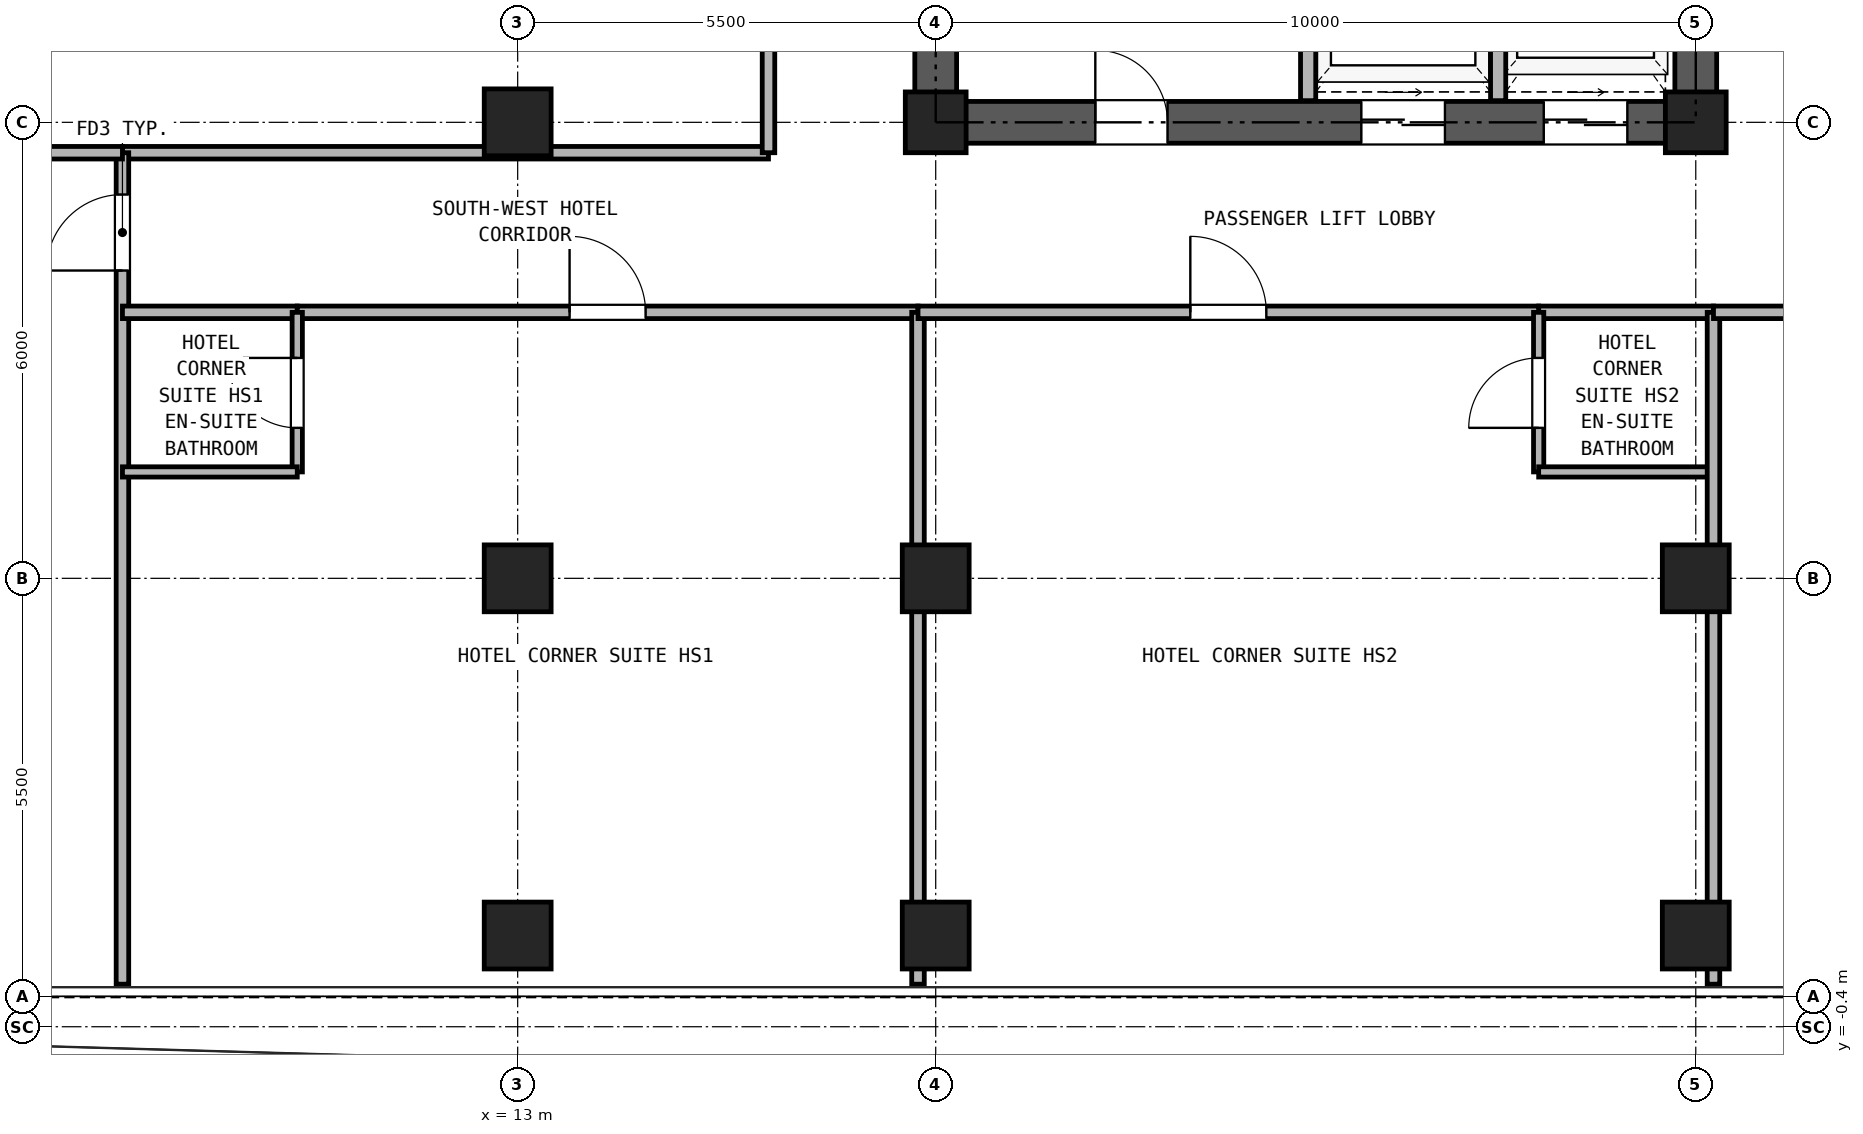
"""IFC4 building model, lengths in metres.
Left out: names, types, materials, properties, quantities, classifications, styles, units other than length and angle.
Written with IfcOpenShell. Run it as: python <this file> out.ifc"""

import sys

from ifc_helpers import new_model, si_unit, direction, frame, frame_2d, origin, origin_2d, place, context, subcontext, project, spatial, rectangle, hollow_rectangle, extrude, source, transform, mapped, element, fill, save


model = new_model("IFC4")
c1 = context("Model", 3, precision=1e-05, world=origin(), true_north=direction((0.0, 1.0)))
c2 = subcontext(c1, "Body", "Model", "MODEL_VIEW")
j1 = project(units=[si_unit("LENGTHUNIT", "METRE"), si_unit("PLANEANGLEUNIT", "RADIAN")], contexts=[c1])
p1 = place(None, origin())
s1 = spatial("IfcSite", under=j1, at=p1, CompositionType="ELEMENT")
p2 = place(p1, origin())
s2 = spatial("IfcBuilding", under=s1, at=p2, CompositionType="ELEMENT")
p3 = place(p2, frame((0.0, 0.0, 148.4)))
s3 = spatial("IfcBuildingStorey", under=s2, at=p3, CompositionType="ELEMENT", Elevation=148.4)
m1 = source(origin(), c2, "Body", "SweptSolid", [
    extrude(hollow_rectangle(XDim=0.88, YDim=0.88, WallThickness=0.05, at=origin_2d()), origin(), (0.0, 0.0, 1.0), 2.84),
])
for number, where, z_axis, x_axis in (
    (1, (13.0, 0.8, 0.0), (0.0, 0.0, 1.0), (1.0, 0.0, 0.0)),
    (2, (18.5, 0.8, 0.0), (0.0, 0.0, 1.0), (1.0, 0.0, 0.0)),
    (3, (28.5, 0.8, 0.0), (0.0, 0.0, 1.0), (1.0, 0.0, 0.0)),
    (4, (13.0, 5.5, 0.0), (0.0, 0.0, 1.0), (1.0, 0.0, 0.0)),
    (5, (13.0, 11.5, 0.0), (0.0, 0.0, 1.0), (1.0, 0.0, 0.0)),
    (6, (18.5, 5.5, 0.0), (0.0, 0.0, 1.0), (1.0, 0.0, 0.0)),
):
    element("IfcColumn", number, at=place(p3, frame(where, z_axis=z_axis, x_axis=x_axis)), inside=s3, PredefinedType="COLUMN", context=c2, shape_type="MappedRepresentation", body=[
        mapped(m1, transform((0.0, 0.0, 0.0), x_axis=(1.0, 0.0, 0.0), y_axis=(0.0, 1.0, 0.0), z_axis=(0.0, 0.0, 1.0), scale=1.0)),
    ])
m2 = source(origin(), c2, "Body", "SweptSolid", [
    extrude(hollow_rectangle(XDim=0.8, YDim=0.8, WallThickness=0.045, at=origin_2d()), origin(), (0.0, 0.0, 1.0), 2.84),
])
p4 = place(p3, frame((18.5, 11.5, 0.0), z_axis=(0.0, 0.0, 1.0), x_axis=(1.0, 0.0, 0.0)))
e7 = element("IfcColumn", 7, at=p4, inside=s3, PredefinedType="COLUMN", context=c2, shape_type="MappedRepresentation", body=[
    mapped(m2, transform((0.0, 0.0, 0.0), x_axis=(1.0, 0.0, 0.0), y_axis=(0.0, 1.0, 0.0), z_axis=(0.0, 0.0, 1.0), scale=1.0)),
])
p5 = place(p3, frame((28.5, 5.5, 0.0), z_axis=(0.0, 0.0, 1.0), x_axis=(1.0, 0.0, 0.0)))
e8 = element("IfcColumn", 8, at=p5, inside=s3, PredefinedType="COLUMN", context=c2, shape_type="MappedRepresentation", body=[
    mapped(m1, transform((0.0, 0.0, 0.0), x_axis=(1.0, 0.0, 0.0), y_axis=(0.0, 1.0, 0.0), z_axis=(0.0, 0.0, 1.0), scale=1.0)),
])
p6 = place(p3, frame((28.5, 11.5, 0.0), z_axis=(0.0, 0.0, 1.0), x_axis=(1.0, 0.0, 0.0)))
e9 = element("IfcColumn", 9, at=p6, inside=s3, PredefinedType="COLUMN", context=c2, shape_type="MappedRepresentation", body=[
    mapped(m2, transform((0.0, 0.0, 0.0), x_axis=(1.0, 0.0, 0.0), y_axis=(0.0, 1.0, 0.0), z_axis=(0.0, 0.0, 1.0), scale=1.0)),
])
p7 = place(p3, frame((18.225, 11.5, 0.0), z_axis=(0.0, 0.0, 1.0), x_axis=(1.0, 0.0, 0.0)))
e10 = element("IfcWall", 10, at=p7, inside=s3, PredefinedType="SHEAR", context=c2, shape_type="SweptSolid", body=[
    extrude(rectangle(XDim=10.55, YDim=0.55, at=frame_2d((5.275, 0.0))), origin(), (0.0, 0.0, 1.0), 2.84),
])
p8 = place(p7, frame((2.375, 0.0, 0.0)))
e11 = element("IfcOpeningElement", 11, at=p8, cuts=e10, PredefinedType="OPENING", context=c2, shape_type="SweptSolid", body=[
    extrude(rectangle(XDim=0.95, YDim=2.15, at=frame_2d((0.475, 1.075))), frame((0.0, 0.285, 0.0), z_axis=(0.0, -1.0, 0.0), x_axis=(1.0, 0.0, 0.0)), (0.0, 0.0, 1.0), 0.57),
])
p9 = place(p7, frame((5.875, 0.0, 0.0)))
e12 = element("IfcOpeningElement", 12, at=p9, cuts=e10, PredefinedType="OPENING", context=c2, shape_type="SweptSolid", body=[
    extrude(rectangle(XDim=1.1, YDim=2.25, at=frame_2d((0.55, 1.125))), frame((0.0, 0.285, 0.0), z_axis=(0.0, -1.0, 0.0), x_axis=(1.0, 0.0, 0.0)), (0.0, 0.0, 1.0), 0.57),
])
p10 = place(p7, frame((8.275, 0.0, 0.0)))
e13 = element("IfcOpeningElement", 13, at=p10, cuts=e10, PredefinedType="OPENING", context=c2, shape_type="SweptSolid", body=[
    extrude(rectangle(XDim=1.1, YDim=2.25, at=frame_2d((0.55, 1.125))), frame((0.0, 0.285, 0.0), z_axis=(0.0, -1.0, 0.0), x_axis=(1.0, 0.0, 0.0)), (0.0, 0.0, 1.0), 0.57),
])
p11 = place(p3, frame((18.5, 11.775, 0.0), z_axis=(0.0, 0.0, 1.0), x_axis=(0.0, 1.0, 0.0)))
e14 = element("IfcWall", 14, at=p11, inside=s3, PredefinedType="SHEAR", context=c2, shape_type="SweptSolid", body=[
    extrude(rectangle(XDim=16.7, YDim=0.55, at=frame_2d((8.35, 0.0))), origin(), (0.0, 0.0, 1.0), 2.84),
])
p12 = place(p11, frame((7.375, 0.0, 0.0)))
e15 = element("IfcOpeningElement", 15, at=p12, cuts=e14, PredefinedType="OPENING", context=c2, shape_type="SweptSolid", body=[
    extrude(rectangle(XDim=1.15, YDim=2.2, at=frame_2d((0.575, 1.1))), frame((0.0, 0.285, 0.0), z_axis=(0.0, -1.0, 0.0), x_axis=(1.0, 0.0, 0.0)), (0.0, 0.0, 1.0), 0.57),
])
p13 = place(p3, frame((28.5, 11.775, 0.0), z_axis=(0.0, 0.0, 1.0), x_axis=(0.0, 1.0, 0.0)))
e16 = element("IfcWall", 16, at=p13, inside=s3, PredefinedType="SHEAR", context=c2, shape_type="SweptSolid", body=[
    extrude(rectangle(XDim=16.7, YDim=0.55, at=frame_2d((8.35, 0.0))), origin(), (0.0, 0.0, 1.0), 2.84),
])
p14 = place(p13, frame((7.375, 0.0, 0.0)))
e17 = element("IfcOpeningElement", 17, at=p14, cuts=e16, PredefinedType="OPENING", context=c2, shape_type="SweptSolid", body=[
    extrude(rectangle(XDim=1.15, YDim=2.2, at=frame_2d((0.575, 1.1))), frame((0.0, 0.285, 0.0), z_axis=(0.0, -1.0, 0.0), x_axis=(1.0, 0.0, 0.0)), (0.0, 0.0, 1.0), 0.57),
])
for number, where, z_axis, x_axis in (
    (18, (23.4, 11.785, 0.0), (0.0, 0.0, 1.0), (0.0, 1.0, 0.0)),
    (19, (25.9, 11.785, 0.0), (0.0, 0.0, 1.0), (0.0, 1.0, 0.0)),
):
    element("IfcWall", number, at=place(p3, frame(where, z_axis=z_axis, x_axis=x_axis)), inside=s3, PredefinedType="PARTITIONING", context=c2, shape_type="SweptSolid", body=[
        extrude(rectangle(XDim=3.215, YDim=0.2, at=frame_2d((1.607, 0.0))), origin(), (0.0, 0.0, 1.0), 2.84),
    ])
p15 = place(p3, frame((7.8, 11.1, 0.0), z_axis=(0.0, 0.0, 1.0), x_axis=(1.0, 0.0, 0.0)))
e20 = element("IfcWall", 20, at=p15, inside=s3, PredefinedType="PARTITIONING", context=c2, shape_type="SweptSolid", body=[
    extrude(rectangle(XDim=8.5, YDim=0.165, at=frame_2d((4.25, 0.0))), origin(), (0.0, 0.0, 1.0), 2.84),
])
p16 = place(p3, frame((16.3, 11.1, 0.0), z_axis=(0.0, 0.0, 1.0), x_axis=(0.0, 1.0, 0.0)))
e21 = element("IfcWall", 21, at=p16, inside=s3, PredefinedType="PARTITIONING", context=c2, shape_type="SweptSolid", body=[
    extrude(rectangle(XDim=18.5, YDim=0.165, at=frame_2d((9.25, 0.0))), origin(), (0.0, 0.0, 1.0), 2.84),
])
p17 = place(p16, frame((4.125, 0.0, 0.0)))
e22 = element("IfcOpeningElement", 22, at=p17, cuts=e21, PredefinedType="OPENING", context=c2, shape_type="SweptSolid", body=[
    extrude(rectangle(XDim=0.95, YDim=2.15, at=frame_2d((0.475, 1.075))), frame((0.0, 0.093, 0.0), z_axis=(0.0, -1.0, 0.0), x_axis=(1.0, 0.0, 0.0)), (0.0, 0.0, 1.0), 0.185),
])
p18 = place(p16, frame((13.375, 0.0, 0.0)))
e23 = element("IfcOpeningElement", 23, at=p18, cuts=e21, PredefinedType="OPENING", context=c2, shape_type="SweptSolid", body=[
    extrude(rectangle(XDim=0.95, YDim=2.15, at=frame_2d((0.475, 1.075))), frame((0.0, 0.093, 0.0), z_axis=(0.0, -1.0, 0.0), x_axis=(1.0, 0.0, 0.0)), (0.0, 0.0, 1.0), 0.185),
])
p19 = place(p3, frame((7.8, 0.16, 0.0), z_axis=(0.0, 0.0, 1.0), x_axis=(0.0, 1.0, 0.0)))
e24 = element("IfcWall", 24, at=p19, inside=s3, PredefinedType="PARTITIONING", context=c2, shape_type="SweptSolid", body=[
    extrude(rectangle(XDim=10.94, YDim=0.165, at=frame_2d((5.47, 0.0))), origin(), (0.0, 0.0, 1.0), 2.84),
])
p20 = place(p19, frame((9.39, 0.0, 0.0)))
e25 = element("IfcOpeningElement", 25, at=p20, cuts=e24, PredefinedType="OPENING", context=c2, shape_type="SweptSolid", body=[
    extrude(rectangle(XDim=1.0, YDim=2.15, at=frame_2d((0.5, 1.075))), frame((0.0, 0.093, 0.0), z_axis=(0.0, -1.0, 0.0), x_axis=(1.0, 0.0, 0.0)), (0.0, 0.0, 1.0), 0.185),
])
p21 = place(p3, frame((0.16, 11.1, 0.0), z_axis=(0.0, 0.0, 1.0), x_axis=(1.0, 0.0, 0.0)))
e26 = element("IfcWall", 26, at=p21, inside=s3, PredefinedType="PARTITIONING", context=c2, shape_type="SweptSolid", body=[
    extrude(rectangle(XDim=7.64, YDim=0.165, at=frame_2d((3.82, 0.0))), origin(), (0.0, 0.0, 1.0), 2.84),
])
p22 = place(p3, frame((7.8, 9.0, 0.0), z_axis=(0.0, 0.0, 1.0), x_axis=(1.0, 0.0, 0.0)))
e27 = element("IfcWall", 27, at=p22, inside=s3, PredefinedType="PARTITIONING", context=c2, shape_type="SweptSolid", body=[
    extrude(rectangle(XDim=2.3, YDim=0.165, at=frame_2d((1.15, 0.0))), origin(), (0.0, 0.0, 1.0), 2.84),
])
p23 = place(p3, frame((10.1, 9.0, 0.0), z_axis=(0.0, 0.0, 1.0), x_axis=(1.0, 0.0, 0.0)))
e28 = element("IfcWall", 28, at=p23, inside=s3, PredefinedType="PARTITIONING", context=c2, shape_type="SweptSolid", body=[
    extrude(rectangle(XDim=8.167, YDim=0.165, at=frame_2d((4.083, 0.0))), origin(), (0.0, 0.0, 1.0), 2.84),
])
p24 = place(p23, frame((3.583, 0.0, 0.0)))
e29 = element("IfcOpeningElement", 29, at=p24, cuts=e28, PredefinedType="OPENING", context=c2, shape_type="SweptSolid", body=[
    extrude(rectangle(XDim=1.0, YDim=2.15, at=frame_2d((0.5, 1.075))), frame((0.0, 0.093, 0.0), z_axis=(0.0, -1.0, 0.0), x_axis=(1.0, 0.0, 0.0)), (0.0, 0.0, 1.0), 0.185),
])
p25 = place(p3, frame((10.1, 6.9, 0.0), z_axis=(0.0, 0.0, 1.0), x_axis=(0.0, 1.0, 0.0)))
e30 = element("IfcWall", 30, at=p25, inside=s3, PredefinedType="PARTITIONING", context=c2, shape_type="SweptSolid", body=[
    extrude(rectangle(XDim=2.1, YDim=0.135, at=frame_2d((1.05, 0.0))), origin(), (0.0, 0.0, 1.0), 2.84),
])
p26 = place(p25, frame((0.58, 0.0, 0.0)))
e31 = element("IfcOpeningElement", 31, at=p26, cuts=e30, PredefinedType="OPENING", context=c2, shape_type="SweptSolid", body=[
    extrude(rectangle(XDim=0.92, YDim=2.1, at=frame_2d((0.46, 1.05))), frame((0.0, 0.077, 0.0), z_axis=(0.0, -1.0, 0.0), x_axis=(1.0, 0.0, 0.0)), (0.0, 0.0, 1.0), 0.155),
])
p27 = place(p3, frame((7.8, 6.9, 0.0), z_axis=(0.0, 0.0, 1.0), x_axis=(1.0, 0.0, 0.0)))
e32 = element("IfcWall", 32, at=p27, inside=s3, PredefinedType="PARTITIONING", context=c2, shape_type="SweptSolid", body=[
    extrude(rectangle(XDim=2.3, YDim=0.135, at=frame_2d((1.15, 0.0))), origin(), (0.0, 0.0, 1.0), 2.84),
])
p28 = place(p3, frame((18.267, 0.16, 0.0), z_axis=(0.0, 0.0, 1.0), x_axis=(0.0, 1.0, 0.0)))
e33 = element("IfcWall", 33, at=p28, inside=s3, PredefinedType="PARTITIONING", context=c2, shape_type="SweptSolid", body=[
    extrude(rectangle(XDim=8.84, YDim=0.165, at=frame_2d((4.42, 0.0))), origin(), (0.0, 0.0, 1.0), 2.137),
])
p29 = place(p3, frame((26.433, 9.0, 0.0), z_axis=(0.0, 0.0, 1.0), x_axis=(1.0, 0.0, 0.0)))
e34 = element("IfcWall", 34, at=p29, inside=s3, PredefinedType="PARTITIONING", context=c2, shape_type="SweptSolid", body=[
    extrude(rectangle(XDim=2.3, YDim=0.165, at=frame_2d((1.15, 0.0))), origin(), (0.0, 0.0, 1.0), 2.84),
])
p30 = place(p3, frame((18.267, 9.0, 0.0), z_axis=(0.0, 0.0, 1.0), x_axis=(1.0, 0.0, 0.0)))
e35 = element("IfcWall", 35, at=p30, inside=s3, PredefinedType="PARTITIONING", context=c2, shape_type="SweptSolid", body=[
    extrude(rectangle(XDim=8.166, YDim=0.165, at=frame_2d((4.083, 0.0))), origin(), (0.0, 0.0, 1.0), 2.84),
])
p31 = place(p30, frame((3.583, 0.0, 0.0)))
e36 = element("IfcOpeningElement", 36, at=p31, cuts=e35, PredefinedType="OPENING", context=c2, shape_type="SweptSolid", body=[
    extrude(rectangle(XDim=1.0, YDim=2.15, at=frame_2d((0.5, 1.075))), frame((0.0, 0.093, 0.0), z_axis=(0.0, -1.0, 0.0), x_axis=(1.0, 0.0, 0.0)), (0.0, 0.0, 1.0), 0.185),
])
p32 = place(p3, frame((26.433, 6.9, 0.0), z_axis=(0.0, 0.0, 1.0), x_axis=(0.0, 1.0, 0.0)))
e37 = element("IfcWall", 37, at=p32, inside=s3, PredefinedType="PARTITIONING", context=c2, shape_type="SweptSolid", body=[
    extrude(rectangle(XDim=2.1, YDim=0.135, at=frame_2d((1.05, 0.0))), origin(), (0.0, 0.0, 1.0), 2.84),
])
p33 = place(p32, frame((0.58, 0.0, 0.0)))
e38 = element("IfcOpeningElement", 38, at=p33, cuts=e37, PredefinedType="OPENING", context=c2, shape_type="SweptSolid", body=[
    extrude(rectangle(XDim=0.92, YDim=2.1, at=frame_2d((0.46, 1.05))), frame((0.0, 0.077, 0.0), z_axis=(0.0, -1.0, 0.0), x_axis=(1.0, 0.0, 0.0)), (0.0, 0.0, 1.0), 0.155),
])
p34 = place(p3, frame((26.433, 6.9, 0.0), z_axis=(0.0, 0.0, 1.0), x_axis=(1.0, 0.0, 0.0)))
e39 = element("IfcWall", 39, at=p34, inside=s3, PredefinedType="PARTITIONING", context=c2, shape_type="SweptSolid", body=[
    extrude(rectangle(XDim=2.3, YDim=0.135, at=frame_2d((1.15, 0.0))), origin(), (0.0, 0.0, 1.0), 2.84),
])
p35 = place(p3, frame((28.733, 0.16, 0.0), z_axis=(0.0, 0.0, 1.0), x_axis=(0.0, 1.0, 0.0)))
e40 = element("IfcWall", 40, at=p35, inside=s3, PredefinedType="PARTITIONING", context=c2, shape_type="SweptSolid", body=[
    extrude(rectangle(XDim=8.84, YDim=0.165, at=frame_2d((4.42, 0.0))), origin(), (0.0, 0.0, 1.0), 2.137),
])
p36 = place(p3, frame((28.733, 9.0, 0.0), z_axis=(0.0, 0.0, 1.0), x_axis=(1.0, 0.0, 0.0)))
e41 = element("IfcWall", 41, at=p36, inside=s3, PredefinedType="PARTITIONING", context=c2, shape_type="SweptSolid", body=[
    extrude(rectangle(XDim=8.167, YDim=0.165, at=frame_2d((4.083, 0.0))), origin(), (0.0, 0.0, 1.0), 2.84),
])
p37 = place(p36, frame((3.584, 0.0, 0.0)))
e42 = element("IfcOpeningElement", 42, at=p37, cuts=e41, PredefinedType="OPENING", context=c2, shape_type="SweptSolid", body=[
    extrude(rectangle(XDim=1.0, YDim=2.15, at=frame_2d((0.5, 1.075))), frame((0.0, 0.093, 0.0), z_axis=(0.0, -1.0, 0.0), x_axis=(1.0, 0.0, 0.0)), (0.0, 0.0, 1.0), 0.185),
])
p38 = place(p8, frame((0.95, 0.0, 0.0), z_axis=(0.0, 0.0, 1.0), x_axis=(-1.0, 0.0, 0.0)))
e43 = element("IfcDoor", 43, at=p38, inside=s3, OperationType="SINGLE_SWING_LEFT", PredefinedType="DOOR", context=c2, shape_type="SweptSolid", body=[
    extrude(rectangle(XDim=0.95, YDim=2.15, at=frame_2d((0.475, 1.075))), frame((0.0, 0.025, 0.0), z_axis=(0.0, -1.0, 0.0), x_axis=(1.0, 0.0, 0.0)), (0.0, 0.0, 1.0), 0.05),
])
fill(e11, e43)
p39 = place(p9, frame((1.1, 0.0, 0.0), z_axis=(0.0, 0.0, 1.0), x_axis=(-1.0, 0.0, 0.0)))
e44 = element("IfcDoor", 44, at=p39, inside=s3, OperationType="DOUBLE_DOOR_SLIDING", PredefinedType="DOOR", context=c2, shape_type="SweptSolid", body=[
    extrude(rectangle(XDim=1.1, YDim=2.25, at=frame_2d((0.55, 1.125))), frame((0.0, 0.025, 0.0), z_axis=(0.0, -1.0, 0.0), x_axis=(1.0, 0.0, 0.0)), (0.0, 0.0, 1.0), 0.05),
])
fill(e12, e44)
p40 = place(p10, frame((1.1, 0.0, 0.0), z_axis=(0.0, 0.0, 1.0), x_axis=(-1.0, 0.0, 0.0)))
e45 = element("IfcDoor", 45, at=p40, inside=s3, OperationType="DOUBLE_DOOR_SLIDING", PredefinedType="DOOR", context=c2, shape_type="SweptSolid", body=[
    extrude(rectangle(XDim=1.1, YDim=2.25, at=frame_2d((0.55, 1.125))), frame((0.0, 0.025, 0.0), z_axis=(0.0, -1.0, 0.0), x_axis=(1.0, 0.0, 0.0)), (0.0, 0.0, 1.0), 0.05),
])
fill(e13, e45)
p41 = place(p20, origin())
e46 = element("IfcDoor", 46, at=p41, inside=s3, OperationType="SINGLE_SWING_LEFT", PredefinedType="DOOR", context=c2, shape_type="SweptSolid", body=[
    extrude(rectangle(XDim=1.0, YDim=2.15, at=frame_2d((0.5, 1.075))), frame((0.0, 0.025, 0.0), z_axis=(0.0, -1.0, 0.0), x_axis=(1.0, 0.0, 0.0)), (0.0, 0.0, 1.0), 0.05),
])
fill(e25, e46)
p42 = place(p26, frame((0.92, 0.0, 0.0), z_axis=(0.0, 0.0, 1.0), x_axis=(-1.0, 0.0, 0.0)))
e47 = element("IfcDoor", 47, at=p42, inside=s3, OperationType="SINGLE_SWING_RIGHT", PredefinedType="DOOR", context=c2, shape_type="SweptSolid", body=[
    extrude(rectangle(XDim=0.92, YDim=2.1, at=frame_2d((0.46, 1.05))), frame((0.0, 0.025, 0.0), z_axis=(0.0, -1.0, 0.0), x_axis=(1.0, 0.0, 0.0)), (0.0, 0.0, 1.0), 0.05),
])
fill(e31, e47)
p43 = place(p24, frame((1.0, 0.0, 0.0), z_axis=(0.0, 0.0, 1.0), x_axis=(-1.0, 0.0, 0.0)))
e48 = element("IfcDoor", 48, at=p43, inside=s3, OperationType="SINGLE_SWING_LEFT", PredefinedType="DOOR", context=c2, shape_type="SweptSolid", body=[
    extrude(rectangle(XDim=1.0, YDim=2.15, at=frame_2d((0.5, 1.075))), frame((0.0, 0.025, 0.0), z_axis=(0.0, -1.0, 0.0), x_axis=(1.0, 0.0, 0.0)), (0.0, 0.0, 1.0), 0.05),
])
fill(e29, e48)
p44 = place(p33, origin())
e49 = element("IfcDoor", 49, at=p44, inside=s3, OperationType="SINGLE_SWING_LEFT", PredefinedType="DOOR", context=c2, shape_type="SweptSolid", body=[
    extrude(rectangle(XDim=0.92, YDim=2.1, at=frame_2d((0.46, 1.05))), frame((0.0, 0.025, 0.0), z_axis=(0.0, -1.0, 0.0), x_axis=(1.0, 0.0, 0.0)), (0.0, 0.0, 1.0), 0.05),
])
fill(e38, e49)
p45 = place(p31, frame((1.0, 0.0, 0.0), z_axis=(0.0, 0.0, 1.0), x_axis=(-1.0, 0.0, 0.0)))
e50 = element("IfcDoor", 50, at=p45, inside=s3, OperationType="SINGLE_SWING_LEFT", PredefinedType="DOOR", context=c2, shape_type="SweptSolid", body=[
    extrude(rectangle(XDim=1.0, YDim=2.15, at=frame_2d((0.5, 1.075))), frame((0.0, 0.025, 0.0), z_axis=(0.0, -1.0, 0.0), x_axis=(1.0, 0.0, 0.0)), (0.0, 0.0, 1.0), 0.05),
])
fill(e36, e50)
save(model, sys.argv[1])
